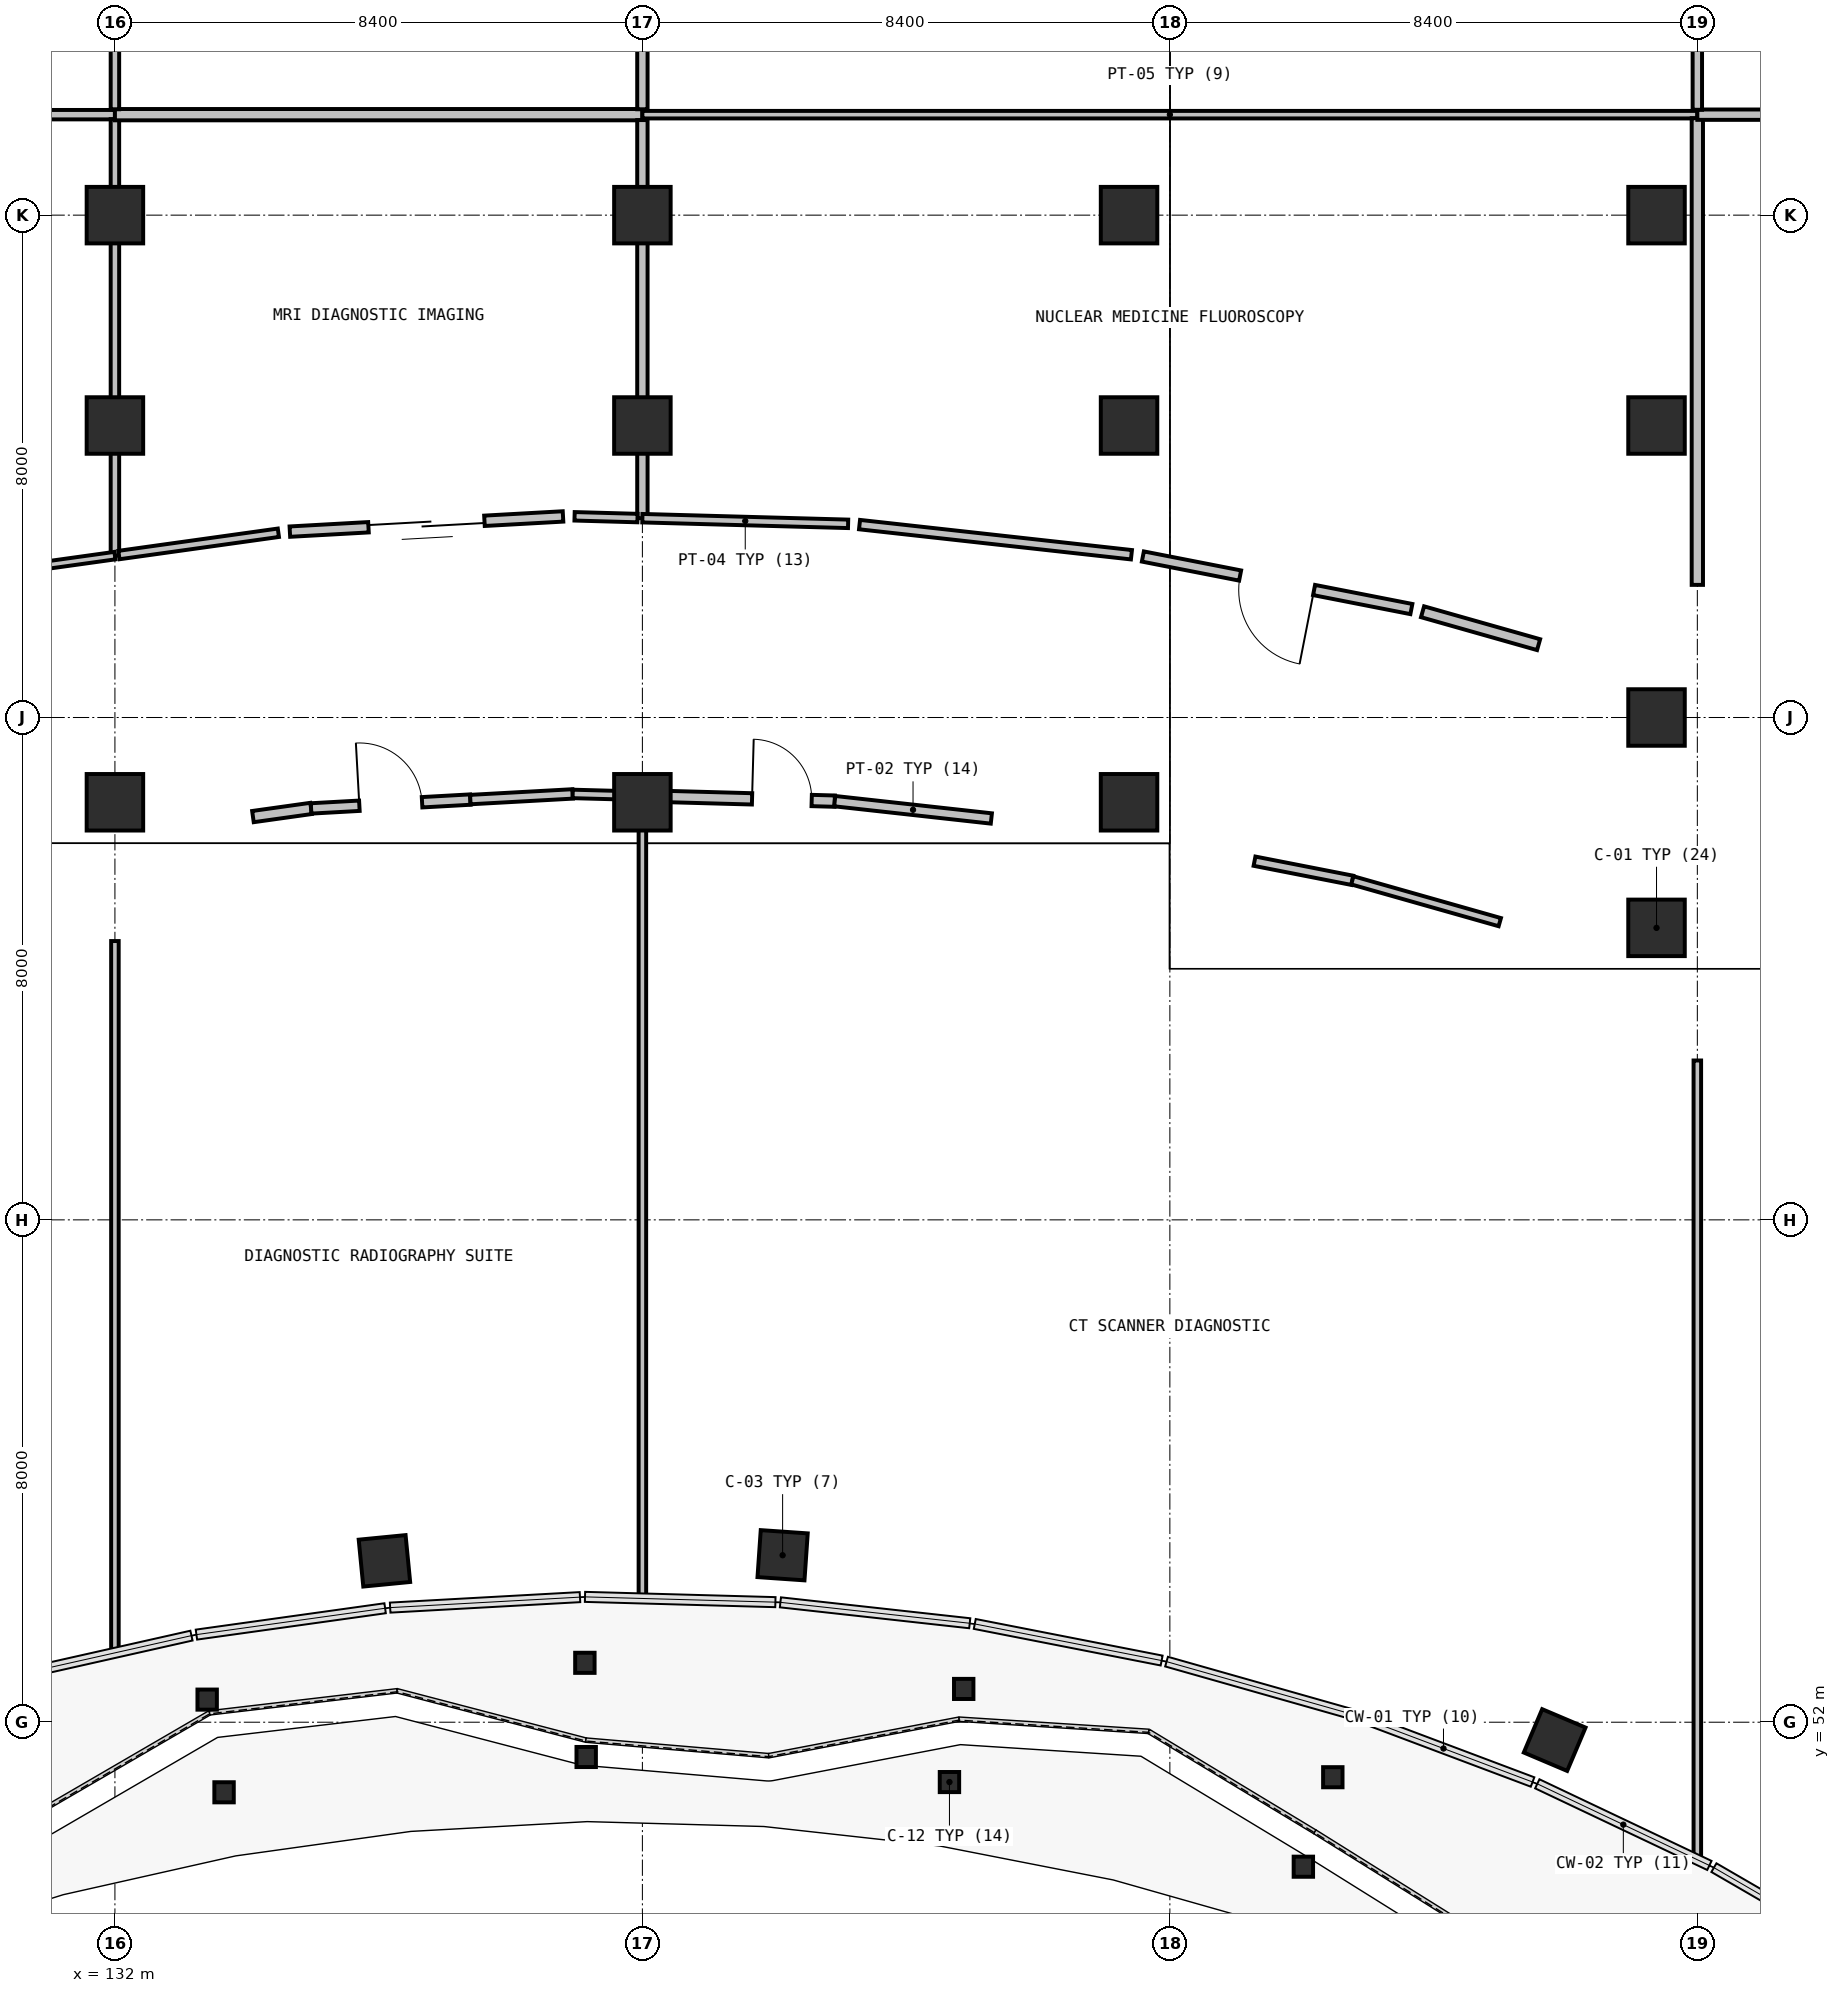
"""IFC4 building model, lengths in metres.
Left out: names, types, materials, properties, quantities, classifications, styles, units other than length and angle.
Written with IfcOpenShell. Run it as: python <this file> out.ifc"""

import sys

from ifc_helpers import new_model, si_unit, direction, frame, frame_2d, origin, origin_2d, place, context, subcontext, project, spatial, rectangle, i_section, extrude, element, fill, save


model = new_model("IFC4")
c1 = context("Model", 3, precision=1e-05, world=origin(), true_north=direction((0.0, 1.0)))
c2 = subcontext(c1, "Body", "Model", "MODEL_VIEW")
j1 = project(units=[si_unit("LENGTHUNIT", "METRE"), si_unit("PLANEANGLEUNIT", "RADIAN")], contexts=[c1])
p1 = place(None, origin())
s1 = spatial("IfcSite", under=j1, at=p1, CompositionType="ELEMENT")
p2 = place(p1, origin())
s2 = spatial("IfcBuilding", under=s1, at=p2, CompositionType="ELEMENT")
p3 = place(p2, origin())
s3 = spatial("IfcBuildingStorey", under=s2, at=p3, CompositionType="ELEMENT", Elevation=0.0)
for number, where, z_axis, x_axis in (
    (1, (133.469, 52.36, 0.0), (0.0, 0.0, 1.0), (1.0, 0.0, 0.0)),
    (2, (133.738, 50.884, 0.0), (0.0, 0.0, 1.0), (1.0, 0.0, 0.0)),
    (3, (139.484, 52.946, 0.0), (0.0, 0.0, 1.0), (1.0, 0.0, 0.0)),
    (4, (139.505, 51.446, 0.0), (0.0, 0.0, 1.0), (1.0, 0.0, 0.0)),
    (5, (145.517, 52.53, 0.0), (0.0, 0.0, 1.0), (1.0, 0.0, 0.0)),
    (6, (145.29, 51.047, 0.0), (0.0, 0.0, 1.0), (1.0, 0.0, 0.0)),
    (7, (151.395, 51.124, 0.0), (0.0, 0.0, 1.0), (1.0, 0.0, 0.0)),
    (8, (150.926, 49.699, 0.0), (0.0, 0.0, 1.0), (1.0, 0.0, 0.0)),
):
    element("IfcColumn", number, at=place(p3, frame(where, z_axis=z_axis, x_axis=x_axis)), inside=s3, PredefinedType="COLUMN", context=c2, shape_type="SweptSolid", body=[
        extrude(i_section(OverallWidth=0.309, OverallDepth=0.321, WebThickness=0.014, FlangeThickness=0.022, at=origin_2d()), origin(), (0.0, 0.0, 1.0), 5.08),
    ])
for number, where, z_axis, x_axis in (
    (9, (132.0, 66.65, 0.0), (0.0, 0.0, 1.0), (1.0, 0.0, 0.0)),
    (10, (132.0, 72.65, 0.0), (0.0, 0.0, 1.0), (1.0, 0.0, 0.0)),
    (11, (132.0, 76.0, 0.0), (0.0, 0.0, 1.0), (1.0, 0.0, 0.0)),
    (12, (140.4, 66.65, 0.0), (0.0, 0.0, 1.0), (1.0, 0.0, 0.0)),
    (13, (140.4, 72.65, 0.0), (0.0, 0.0, 1.0), (1.0, 0.0, 0.0)),
    (14, (140.4, 76.0, 0.0), (0.0, 0.0, 1.0), (1.0, 0.0, 0.0)),
    (15, (148.15, 66.65, 0.0), (0.0, 0.0, 1.0), (1.0, 0.0, 0.0)),
    (16, (148.15, 72.65, 0.0), (0.0, 0.0, 1.0), (1.0, 0.0, 0.0)),
    (17, (148.15, 76.0, 0.0), (0.0, 0.0, 1.0), (1.0, 0.0, 0.0)),
    (18, (156.55, 64.65, 0.0), (0.0, 0.0, 1.0), (1.0, 0.0, 0.0)),
    (19, (156.55, 68.0, 0.0), (0.0, 0.0, 1.0), (1.0, 0.0, 0.0)),
    (20, (156.55, 72.65, 0.0), (0.0, 0.0, 1.0), (1.0, 0.0, 0.0)),
    (21, (156.55, 76.0, 0.0), (0.0, 0.0, 1.0), (1.0, 0.0, 0.0)),
):
    element("IfcColumn", number, at=place(p3, frame(where, z_axis=z_axis, x_axis=x_axis)), inside=s3, PredefinedType="COLUMN", context=c2, shape_type="SweptSolid", body=[
        extrude(rectangle(XDim=0.9, YDim=0.9, at=origin_2d()), origin(), (0.0, 0.0, 1.0), 5.4),
    ])
for number, where, z_axis, x_axis in (
    (22, (136.292, 54.57, 0.0), (0.0, 0.0, 1.0), (-0.097, 0.995, 0.0)),
    (23, (142.633, 54.659, 0.0), (0.0, 0.0, 1.0), (0.069, 0.998, 0.0)),
    (24, (154.928, 51.716, 0.0), (0.0, 0.0, 1.0), (0.39, 0.921, 0.0)),
):
    element("IfcColumn", number, at=place(p3, frame(where, z_axis=z_axis, x_axis=x_axis)), inside=s3, PredefinedType="COLUMN", context=c2, shape_type="SweptSolid", body=[
        extrude(rectangle(XDim=0.75, YDim=0.75, at=origin_2d()), origin(), (0.0, 0.0, 1.0), 5.4),
    ])
p4 = place(p3, frame((132.0, 64.44, 0.0), z_axis=(0.0, 0.0, 1.0), x_axis=(0.0, -1.0, 0.0)))
e25 = element("IfcWall", 25, at=p4, inside=s3, PredefinedType="PARTITIONING", context=c2, shape_type="SweptSolid", body=[
    extrude(rectangle(XDim=11.324, YDim=0.12, at=frame_2d((5.662, 0.0))), origin(), (0.0, 0.0, 1.0), 5.08),
])
p5 = place(p3, frame((123.6, 77.6, 0.0), z_axis=(0.0, 0.0, 1.0), x_axis=(1.0, 0.0, 0.0)))
e26 = element("IfcWall", 26, at=p5, inside=s3, PredefinedType="PARTITIONING", context=c2, shape_type="SweptSolid", body=[
    extrude(rectangle(XDim=8.4, YDim=0.15, at=frame_2d((4.2, 0.0))), origin(), (0.0, 0.0, 1.0), 5.08),
])
p6 = place(p3, frame((132.0, 77.529, 0.0), z_axis=(0.0, 0.0, 1.0), x_axis=(0.0, -1.0, 0.0)))
e27 = element("IfcWall", 27, at=p6, inside=s3, PredefinedType="PARTITIONING", context=c2, shape_type="SweptSolid", body=[
    extrude(rectangle(XDim=6.951, YDim=0.135, at=frame_2d((3.476, 0.0))), origin(), (0.0, 0.0, 1.0), 4.33),
])
p7 = place(p3, frame((132.0, 70.578, 0.0), z_axis=(0.0, 0.0, 1.0), x_axis=(-0.990423758249, -0.13806078044, 0.0)))
e28 = element("IfcWall", 28, at=p7, inside=s3, PredefinedType="PARTITIONING", context=c2, shape_type="SweptSolid", body=[
    extrude(rectangle(XDim=1.729, YDim=0.12, at=frame_2d((0.865, 0.0))), origin(), (0.0, 0.0, 1.0), 5.08),
])
p8 = place(p3, frame((134.198, 66.422, 0.0), z_axis=(0.0, 0.0, 1.0), x_axis=(0.990306582214, 0.138898787698, 0.0)))
e29 = element("IfcWall", 29, at=p8, inside=s3, PredefinedType="PARTITIONING", context=c2, shape_type="SweptSolid", body=[
    extrude(rectangle(XDim=0.935, YDim=0.18, at=frame_2d((0.468, 0.0))), origin(), (0.0, 0.0, 1.0), 4.23),
])
p9 = place(p3, frame((135.124, 66.552, 0.0), z_axis=(0.0, 0.0, 1.0), x_axis=(0.998455321002, 0.055560525228, 0.0)))
e30 = element("IfcWall", 30, at=p9, inside=s3, PredefinedType="PARTITIONING", context=c2, shape_type="SweptSolid", body=[
    extrude(rectangle(XDim=2.54, YDim=0.165, at=frame_2d((1.27, 0.0))), origin(), (0.0, 0.0, 1.0), 4.23),
])
p10 = place(p9, frame((0.77, 0.0, 0.0)))
e31 = element("IfcOpeningElement", 31, at=p10, cuts=e30, PredefinedType="OPENING", context=c2, shape_type="SweptSolid", body=[
    extrude(rectangle(XDim=1.0, YDim=2.15, at=frame_2d((0.5, 1.075))), frame((0.0, 0.093, 0.0), z_axis=(0.0, -1.0, 0.0), x_axis=(1.0, 0.0, 0.0)), (0.0, 0.0, 1.0), 0.185),
])
p11 = place(p3, frame((137.66, 66.693, 0.0), z_axis=(0.0, 0.0, 1.0), x_axis=(0.998484643385, 0.055031054181, 0.0)))
e32 = element("IfcWall", 32, at=p11, inside=s3, PredefinedType="PARTITIONING", context=c2, shape_type="SweptSolid", body=[
    extrude(rectangle(XDim=1.633, YDim=0.15, at=frame_2d((0.816, 0.0))), origin(), (0.0, 0.0, 1.0), 4.23),
])
p12 = place(p3, frame((139.29, 66.783, 0.0), z_axis=(0.0, 0.0, 1.0), x_axis=(0.999634166902, -0.027046854934, 0.0)))
e33 = element("IfcWall", 33, at=p12, inside=s3, PredefinedType="PARTITIONING", context=c2, shape_type="SweptSolid", body=[
    extrude(rectangle(XDim=1.11, YDim=0.135, at=frame_2d((0.555, 0.0))), origin(), (0.0, 0.0, 1.0), 4.23),
])
p13 = place(p3, frame((140.4, 66.753, 0.0), z_axis=(0.0, 0.0, 1.0), x_axis=(0.0, -1.0, 0.0)))
e34 = element("IfcWall", 34, at=p13, inside=s3, PredefinedType="PARTITIONING", context=c2, shape_type="SweptSolid", body=[
    extrude(rectangle(XDim=12.771, YDim=0.12, at=frame_2d((6.385, 0.0))), origin(), (0.0, 0.0, 1.0), 5.08),
])
p14 = place(p3, frame((139.136, 71.202, 0.0), z_axis=(0.0, 0.0, 1.0), x_axis=(-0.998456902881, -0.055532090625, 0.0)))
e35 = element("IfcWall", 35, at=p14, inside=s3, PredefinedType="PARTITIONING", context=c2, shape_type="SweptSolid", body=[
    extrude(rectangle(XDim=4.357, YDim=0.165, at=frame_2d((2.178, 0.0))), origin(), (0.0, 0.0, 1.0), 5.08),
])
p15 = place(p14, frame((1.253, 0.0, 0.0)))
e36 = element("IfcOpeningElement", 36, at=p15, cuts=e35, PredefinedType="OPENING", context=c2, shape_type="SweptSolid", body=[
    extrude(rectangle(XDim=1.85, YDim=2.25, at=frame_2d((0.925, 1.125))), frame((0.0, 0.093, 0.0), z_axis=(0.0, -1.0, 0.0), x_axis=(1.0, 0.0, 0.0)), (0.0, 0.0, 1.0), 0.185),
])
p16 = place(p3, frame((134.603, 70.942, 0.0), z_axis=(0.0, 0.0, 1.0), x_axis=(-0.990367880246, -0.138461047873, 0.0)))
e37 = element("IfcWall", 37, at=p16, inside=s3, PredefinedType="PARTITIONING", context=c2, shape_type="SweptSolid", body=[
    extrude(rectangle(XDim=2.564, YDim=0.135, at=frame_2d((1.282, 0.0))), origin(), (0.0, 0.0, 1.0), 5.08),
])
p17 = place(p3, frame((132.0, 77.6, 0.0), z_axis=(0.0, 0.0, 1.0), x_axis=(1.0, 0.0, 0.0)))
e38 = element("IfcWall", 38, at=p17, inside=s3, PredefinedType="PARTITIONING", context=c2, shape_type="SweptSolid", body=[
    extrude(rectangle(XDim=8.4, YDim=0.18, at=frame_2d((4.2, 0.0))), origin(), (0.0, 0.0, 1.0), 5.08),
])
p18 = place(p3, frame((140.4, 77.514, 0.0), z_axis=(0.0, 0.0, 1.0), x_axis=(0.0, -1.0, 0.0)))
e39 = element("IfcWall", 39, at=p18, inside=s3, PredefinedType="PARTITIONING", context=c2, shape_type="SweptSolid", body=[
    extrude(rectangle(XDim=6.34, YDim=0.165, at=frame_2d((3.17, 0.0))), origin(), (0.0, 0.0, 1.0), 4.33),
])
p19 = place(p3, frame((140.322, 71.176, 0.0), z_axis=(0.0, 0.0, 1.0), x_axis=(-0.999607630432, 0.028010447734, 0.0)))
e40 = element("IfcWall", 40, at=p19, inside=s3, PredefinedType="PARTITIONING", context=c2, shape_type="SweptSolid", body=[
    extrude(rectangle(XDim=1.002, YDim=0.135, at=frame_2d((0.501, 0.0))), origin(), (0.0, 0.0, 1.0), 5.08),
])
p20 = place(p3, frame((140.456, 66.751, 0.0), z_axis=(0.0, 0.0, 1.0), x_axis=(0.999619161953, -0.027595852149, 0.0)))
e41 = element("IfcWall", 41, at=p20, inside=s3, PredefinedType="PARTITIONING", context=c2, shape_type="SweptSolid", body=[
    extrude(rectangle(XDim=3.008, YDim=0.18, at=frame_2d((1.504, 0.0))), origin(), (0.0, 0.0, 1.0), 4.23),
])
p21 = place(p20, frame((1.691, 0.0, 0.0)))
e42 = element("IfcOpeningElement", 42, at=p21, cuts=e41, PredefinedType="OPENING", context=c2, shape_type="SweptSolid", body=[
    extrude(rectangle(XDim=0.95, YDim=2.1, at=frame_2d((0.475, 1.05))), frame((0.0, 0.1, 0.0), z_axis=(0.0, -1.0, 0.0), x_axis=(1.0, 0.0, 0.0)), (0.0, 0.0, 1.0), 0.2),
])
p22 = place(p3, frame((143.463, 66.668, 0.0), z_axis=(0.0, 0.0, 1.0), x_axis=(0.993938191899, -0.109940305095, 0.0)))
e43 = element("IfcWall", 43, at=p22, inside=s3, PredefinedType="PARTITIONING", context=c2, shape_type="SweptSolid", body=[
    extrude(rectangle(XDim=2.509, YDim=0.165, at=frame_2d((1.255, 0.0))), origin(), (0.0, 0.0, 1.0), 4.23),
])
p23 = place(p3, frame((150.148, 65.712, 0.0), z_axis=(0.0, 0.0, 1.0), x_axis=(0.981382574588, -0.192063120599, 0.0)))
e44 = element("IfcWall", 44, at=p23, inside=s3, PredefinedType="PARTITIONING", context=c2, shape_type="SweptSolid", body=[
    extrude(rectangle(XDim=1.588, YDim=0.15, at=frame_2d((0.794, 0.0))), origin(), (0.0, 0.0, 1.0), 5.08),
])
p24 = place(p3, frame((151.706, 65.407, 0.0), z_axis=(0.0, 0.0, 1.0), x_axis=(0.962043159464, -0.272897342104, 0.0)))
e45 = element("IfcWall", 45, at=p24, inside=s3, PredefinedType="PARTITIONING", context=c2, shape_type="SweptSolid", body=[
    extrude(rectangle(XDim=2.44, YDim=0.135, at=frame_2d((1.22, 0.0))), origin(), (0.0, 0.0, 1.0), 5.08),
])
p25 = place(p3, frame((157.2, 62.538, 0.0), z_axis=(0.0, 0.0, 1.0), x_axis=(0.0, -1.0, 0.0)))
e46 = element("IfcWall", 46, at=p25, inside=s3, PredefinedType="PARTITIONING", context=c2, shape_type="SweptSolid", body=[
    extrude(rectangle(XDim=12.715, YDim=0.12, at=frame_2d((6.357, 0.0))), origin(), (0.0, 0.0, 1.0), 5.08),
])
p26 = place(p3, frame((154.672, 69.16, 0.0), z_axis=(0.0, 0.0, 1.0), x_axis=(-0.962054472446, 0.272857457377, 0.0)))
e47 = element("IfcWall", 47, at=p26, inside=s3, PredefinedType="PARTITIONING", context=c2, shape_type="SweptSolid", body=[
    extrude(rectangle(XDim=1.921, YDim=0.18, at=frame_2d((0.96, 0.0))), origin(), (0.0, 0.0, 1.0), 5.08),
])
p27 = place(p3, frame((152.646, 69.727, 0.0), z_axis=(0.0, 0.0, 1.0), x_axis=(-0.981378420513, 0.19208434541, 0.0)))
e48 = element("IfcWall", 48, at=p27, inside=s3, PredefinedType="PARTITIONING", context=c2, shape_type="SweptSolid", body=[
    extrude(rectangle(XDim=4.357, YDim=0.165, at=frame_2d((2.178, 0.0))), origin(), (0.0, 0.0, 1.0), 5.08),
])
p28 = place(p27, frame((1.579, 0.0, 0.0)))
e49 = element("IfcOpeningElement", 49, at=p28, cuts=e48, PredefinedType="OPENING", context=c2, shape_type="SweptSolid", body=[
    extrude(rectangle(XDim=1.2, YDim=2.15, at=frame_2d((0.6, 1.075))), frame((0.0, 0.093, 0.0), z_axis=(0.0, -1.0, 0.0), x_axis=(1.0, 0.0, 0.0)), (0.0, 0.0, 1.0), 0.185),
])
p29 = place(p3, frame((148.188, 70.592, 0.0), z_axis=(0.0, 0.0, 1.0), x_axis=(-0.99391240414, 0.110173195001, 0.0)))
e50 = element("IfcWall", 50, at=p29, inside=s3, PredefinedType="PARTITIONING", context=c2, shape_type="SweptSolid", body=[
    extrude(rectangle(XDim=4.357, YDim=0.15, at=frame_2d((2.178, 0.0))), origin(), (0.0, 0.0, 1.0), 5.08),
])
p30 = place(p3, frame((143.676, 71.084, 0.0), z_axis=(0.0, 0.0, 1.0), x_axis=(-0.999622135389, 0.02748793263, 0.0)))
e51 = element("IfcWall", 51, at=p30, inside=s3, PredefinedType="PARTITIONING", context=c2, shape_type="SweptSolid", body=[
    extrude(rectangle(XDim=3.277, YDim=0.135, at=frame_2d((1.639, 0.0))), origin(), (0.0, 0.0, 1.0), 5.08),
])
p31 = place(p3, frame((140.4, 77.6, 0.0), z_axis=(0.0, 0.0, 1.0), x_axis=(1.0, 0.0, 0.0)))
e52 = element("IfcWall", 52, at=p31, inside=s3, PredefinedType="PARTITIONING", context=c2, shape_type="SweptSolid", body=[
    extrude(rectangle(XDim=16.8, YDim=0.12, at=frame_2d((8.4, 0.0))), origin(), (0.0, 0.0, 1.0), 5.08),
])
p32 = place(p3, frame((157.2, 77.544, 0.0), z_axis=(0.0, 0.0, 1.0), x_axis=(0.0, -1.0, 0.0)))
e53 = element("IfcWall", 53, at=p32, inside=s3, PredefinedType="PARTITIONING", context=c2, shape_type="SweptSolid", body=[
    extrude(rectangle(XDim=7.432, YDim=0.18, at=frame_2d((3.716, 0.0))), origin(), (0.0, 0.0, 1.0), 5.08),
])
p33 = place(p3, frame((157.2, 77.6, 0.0), z_axis=(0.0, 0.0, 1.0), x_axis=(1.0, 0.0, 0.0)))
e54 = element("IfcWall", 54, at=p33, inside=s3, PredefinedType="PARTITIONING", context=c2, shape_type="SweptSolid", body=[
    extrude(rectangle(XDim=3.803, YDim=0.165, at=frame_2d((1.901, 0.0))), origin(), (0.0, 0.0, 1.0), 5.08),
])
p34 = place(p3, frame((132.0, 105.378, 0.0), z_axis=(0.0, 0.0, 1.0), x_axis=(0.0, -1.0, 0.0)))
e55 = element("IfcWall", 55, at=p34, inside=s3, PredefinedType="PARTITIONING", context=c2, shape_type="SweptSolid", body=[
    extrude(rectangle(XDim=27.692, YDim=0.135, at=frame_2d((13.846, 0.0))), origin(), (0.0, 0.0, 1.0), 4.33),
])
p35 = place(p3, frame((140.4, 105.354, 0.0), z_axis=(0.0, 0.0, 1.0), x_axis=(0.0, -1.0, 0.0)))
e56 = element("IfcWall", 56, at=p35, inside=s3, PredefinedType="PARTITIONING", context=c2, shape_type="SweptSolid", body=[
    extrude(rectangle(XDim=27.668, YDim=0.165, at=frame_2d((13.834, 0.0))), origin(), (0.0, 0.0, 1.0), 4.33),
])
p36 = place(p3, frame((157.2, 79.504, 0.0), z_axis=(0.0, 0.0, 1.0), x_axis=(0.0, -1.0, 0.0)))
e57 = element("IfcWall", 57, at=p36, inside=s3, PredefinedType="PARTITIONING", context=c2, shape_type="SweptSolid", body=[
    extrude(rectangle(XDim=1.826, YDim=0.15, at=frame_2d((0.913, 0.0))), origin(), (0.0, 0.0, 1.0), 5.08),
])
p37 = place(p10, origin())
e58 = element("IfcDoor", 58, at=p37, inside=s3, OperationType="SINGLE_SWING_LEFT", PredefinedType="DOOR", context=c2, shape_type="SweptSolid", body=[
    extrude(rectangle(XDim=1.0, YDim=2.15, at=frame_2d((0.5, 1.075))), frame((0.0, 0.025, 0.0), z_axis=(0.0, -1.0, 0.0), x_axis=(1.0, 0.0, 0.0)), (0.0, 0.0, 1.0), 0.05),
])
fill(e31, e58)
p38 = place(p15, origin())
e59 = element("IfcDoor", 59, at=p38, inside=s3, OperationType="DOUBLE_DOOR_SLIDING", PredefinedType="DOOR", context=c2, shape_type="SweptSolid", body=[
    extrude(rectangle(XDim=1.85, YDim=2.25, at=frame_2d((0.925, 1.125))), frame((0.0, 0.025, 0.0), z_axis=(0.0, -1.0, 0.0), x_axis=(1.0, 0.0, 0.0)), (0.0, 0.0, 1.0), 0.05),
])
fill(e36, e59)
p39 = place(p21, origin())
e60 = element("IfcDoor", 60, at=p39, inside=s3, OperationType="SINGLE_SWING_RIGHT", PredefinedType="DOOR", context=c2, shape_type="SweptSolid", body=[
    extrude(rectangle(XDim=0.95, YDim=2.1, at=frame_2d((0.475, 1.05))), frame((0.0, 0.025, 0.0), z_axis=(0.0, -1.0, 0.0), x_axis=(1.0, 0.0, 0.0)), (0.0, 0.0, 1.0), 0.05),
])
fill(e42, e60)
p40 = place(p28, origin())
e61 = element("IfcDoor", 61, at=p40, inside=s3, OperationType="SINGLE_SWING_LEFT", PredefinedType="DOOR", context=c2, shape_type="SweptSolid", body=[
    extrude(rectangle(XDim=1.2, YDim=2.15, at=frame_2d((0.6, 1.075))), frame((0.0, 0.025, 0.0), z_axis=(0.0, -1.0, 0.0), x_axis=(1.0, 0.0, 0.0)), (0.0, 0.0, 1.0), 0.05),
])
fill(e49, e61)
save(model, sys.argv[1])
